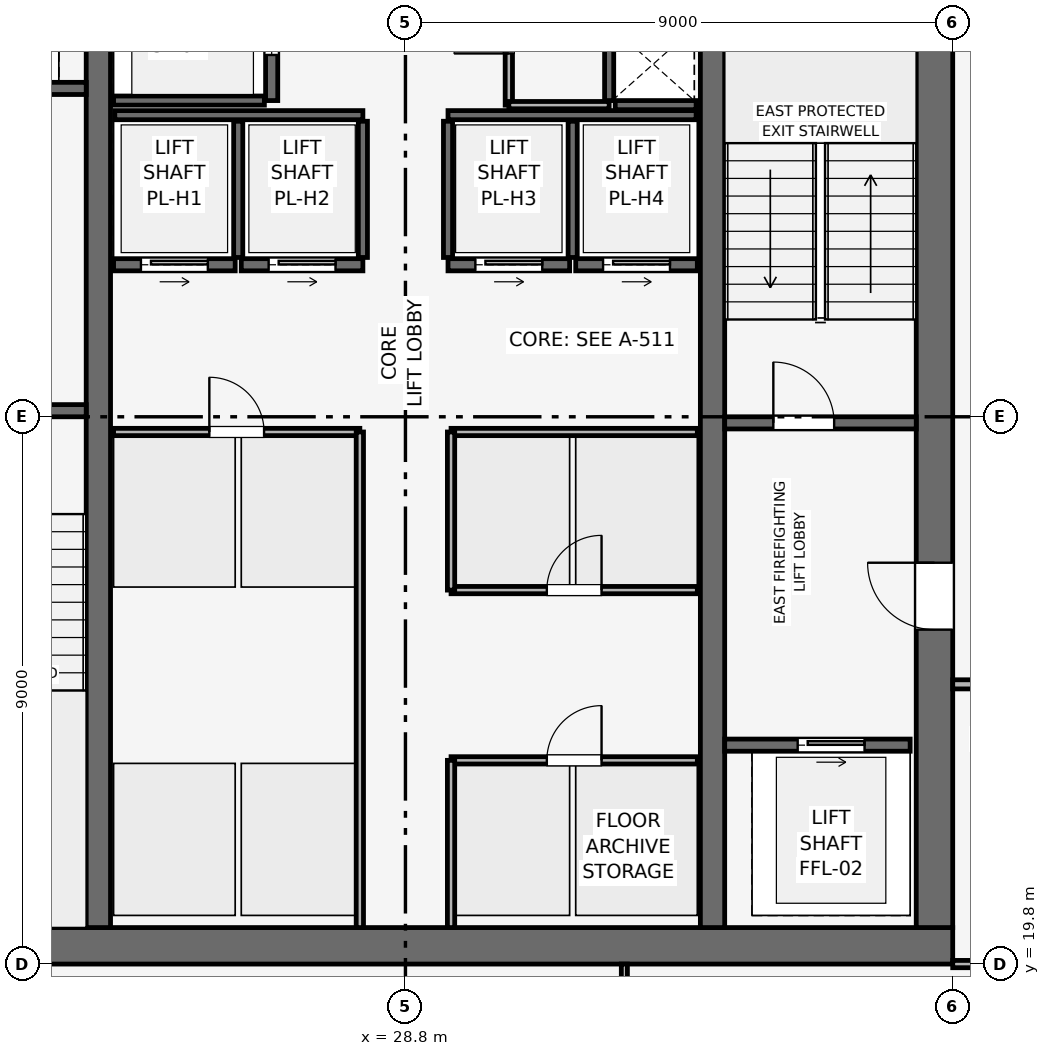
"""IFC4 building model, lengths in metres.
Left out: names, types, materials, properties, quantities, classifications, styles, units other than length and angle.
Written with IfcOpenShell. Run it as: python <this file> out.ifc"""

import sys

from ifc_helpers import new_model, si_unit, direction, frame, frame_2d, origin, place, context, subcontext, project, spatial, rectangle, extrude, element, fill, save


model = new_model("IFC4")
c1 = context("Model", 3, precision=1e-05, world=origin(), true_north=direction((0.0, 1.0)))
c2 = subcontext(c1, "Body", "Model", "MODEL_VIEW")
j1 = project(units=[si_unit("LENGTHUNIT", "METRE"), si_unit("PLANEANGLEUNIT", "RADIAN")], contexts=[c1])
p1 = place(None, origin())
s1 = spatial("IfcSite", under=j1, at=p1, CompositionType="ELEMENT")
p2 = place(p1, origin())
s2 = spatial("IfcBuilding", under=s1, at=p2, CompositionType="ELEMENT")
p3 = place(p2, frame((0.0, 0.0, 336.75)))
s3 = spatial("IfcBuildingStorey", under=s2, at=p3, CompositionType="ELEMENT", Elevation=336.75)
p4 = place(p3, frame((19.8, 20.1, 0.0), z_axis=(0.0, 0.0, 1.0), x_axis=(1.0, 0.0, 0.0)))
e1 = element("IfcWall", 1, at=p4, inside=s3, PredefinedType="SHEAR", context=c2, shape_type="SweptSolid", body=[
    extrude(rectangle(XDim=18.0, YDim=0.6, at=frame_2d((9.0, 0.0))), origin(), (0.0, 0.0, 1.0), 3.75),
])
p5 = place(p3, frame((37.5, 20.4, 0.0), z_axis=(0.0, 0.0, 1.0), x_axis=(0.0, 1.0, 0.0)))
e2 = element("IfcWall", 2, at=p5, inside=s3, PredefinedType="SHEAR", context=c2, shape_type="SweptSolid", body=[
    extrude(rectangle(XDim=16.8, YDim=0.6, at=frame_2d((8.4, 0.0))), origin(), (0.0, 0.0, 1.0), 3.75),
])
p6 = place(p5, frame((4.9, 0.0, 0.0)))
e3 = element("IfcOpeningElement", 3, at=p6, cuts=e2, PredefinedType="OPENING", context=c2, shape_type="SweptSolid", body=[
    extrude(rectangle(XDim=1.1, YDim=2.15, at=frame_2d((0.55, 1.075))), frame((0.0, 0.31, 0.0), z_axis=(0.0, -1.0, 0.0), x_axis=(1.0, 0.0, 0.0)), (0.0, 0.0, 1.0), 0.62),
])
for number, where, z_axis, x_axis in (
    (4, (23.75, 20.4, 0.0), (0.0, 0.0, 1.0), (0.0, 1.0, 0.0)),
    (5, (33.85, 20.4, 0.0), (0.0, 0.0, 1.0), (0.0, 1.0, 0.0)),
):
    element("IfcWall", number, at=place(p3, frame(where, z_axis=z_axis, x_axis=x_axis)), inside=s3, PredefinedType="SHEAR", context=c2, shape_type="SweptSolid", body=[
        extrude(rectangle(XDim=16.8, YDim=0.4, at=frame_2d((8.4, 0.0))), origin(), (0.0, 0.0, 1.0), 3.75),
    ])
p7 = place(p3, frame((20.4, 28.9, 0.0), z_axis=(0.0, 0.0, 1.0), x_axis=(1.0, 0.0, 0.0)))
e6 = element("IfcWall", 6, at=p7, inside=s3, PredefinedType="SHEAR", context=c2, shape_type="SweptSolid", body=[
    extrude(rectangle(XDim=3.15, YDim=0.2, at=frame_2d((1.575, 0.0))), origin(), (0.0, 0.0, 1.0), 3.51),
])
p8 = place(p7, frame((0.8, 0.0, 0.0)))
e7 = element("IfcOpeningElement", 7, at=p8, cuts=e6, PredefinedType="OPENING", context=c2, shape_type="SweptSolid", body=[
    extrude(rectangle(XDim=1.0, YDim=2.1, at=frame_2d((0.5, 1.05))), frame((0.0, 0.11, 0.0), z_axis=(0.0, -1.0, 0.0), x_axis=(1.0, 0.0, 0.0)), (0.0, 0.0, 1.0), 0.22),
])
p9 = place(p3, frame((34.05, 28.7, 0.0), z_axis=(0.0, 0.0, 1.0), x_axis=(1.0, 0.0, 0.0)))
e8 = element("IfcWall", 8, at=p9, inside=s3, PredefinedType="SHEAR", context=c2, shape_type="SweptSolid", body=[
    extrude(rectangle(XDim=3.15, YDim=0.2, at=frame_2d((1.575, 0.0))), origin(), (0.0, 0.0, 1.0), 3.51),
])
p10 = place(p9, frame((0.8, 0.0, 0.0)))
e9 = element("IfcOpeningElement", 9, at=p10, cuts=e8, PredefinedType="OPENING", context=c2, shape_type="SweptSolid", body=[
    extrude(rectangle(XDim=1.0, YDim=2.1, at=frame_2d((0.5, 1.05))), frame((0.0, 0.11, 0.0), z_axis=(0.0, -1.0, 0.0), x_axis=(1.0, 0.0, 0.0)), (0.0, 0.0, 1.0), 0.22),
])
p11 = place(p3, frame((32.15, 34.0, 0.0), z_axis=(0.0, 0.0, 1.0), x_axis=(0.0, 1.0, 0.0)))
e10 = element("IfcWall", 10, at=p11, inside=s3, PredefinedType="SHEAR", context=c2, shape_type="SweptSolid", body=[
    extrude(rectangle(XDim=3.2, YDim=0.15, at=frame_2d((1.6, 0.0))), origin(), (0.0, 0.0, 1.0), 3.51),
])
p12 = place(p3, frame((32.25, 33.925, 0.0), z_axis=(0.0, 0.0, 1.0), x_axis=(1.0, 0.0, 0.0)))
e11 = element("IfcWall", 11, at=p12, inside=s3, PredefinedType="SHEAR", context=c2, shape_type="SweptSolid", body=[
    extrude(rectangle(XDim=1.33, YDim=0.15, at=frame_2d((0.665, 0.0))), origin(), (0.0, 0.0, 1.0), 3.51),
])
p13 = place(p3, frame((20.5, 34.2, 0.0), z_axis=(0.0, 0.0, 1.0), x_axis=(1.0, 0.0, 0.0)))
e12 = element("IfcWall", 12, at=p13, inside=s3, PredefinedType="SHEAR", context=c2, shape_type="SweptSolid", body=[
    extrude(rectangle(XDim=3.05, YDim=0.2, at=frame_2d((1.525, 0.0))), origin(), (0.0, 0.0, 1.0), 3.51),
])
p14 = place(p13, frame((0.75, 0.0, 0.0)))
e13 = element("IfcOpeningElement", 13, at=p14, cuts=e12, PredefinedType="OPENING", context=c2, shape_type="SweptSolid", body=[
    extrude(rectangle(XDim=1.1, YDim=2.15, at=frame_2d((0.55, 1.075))), frame((0.0, 0.11, 0.0), z_axis=(0.0, -1.0, 0.0), x_axis=(1.0, 0.0, 0.0)), (0.0, 0.0, 1.0), 0.22),
])
p15 = place(p3, frame((34.05, 23.4, 0.0), z_axis=(0.0, 0.0, 1.0), x_axis=(1.0, 0.0, 0.0)))
e14 = element("IfcWall", 14, at=p15, inside=s3, PredefinedType="SHEAR", context=c2, shape_type="SweptSolid", body=[
    extrude(rectangle(XDim=3.05, YDim=0.2, at=frame_2d((1.525, 0.0))), origin(), (0.0, 0.0, 1.0), 3.51),
])
p16 = place(p15, frame((1.2, 0.0, 0.0)))
e15 = element("IfcOpeningElement", 15, at=p16, cuts=e14, PredefinedType="OPENING", context=c2, shape_type="SweptSolid", body=[
    extrude(rectangle(XDim=1.1, YDim=2.15, at=frame_2d((0.55, 1.075))), frame((0.0, 0.11, 0.0), z_axis=(0.0, -1.0, 0.0), x_axis=(1.0, 0.0, 0.0)), (0.0, 0.0, 1.0), 0.22),
])
p17 = place(p3, frame((26.6, 34.0, 0.0), z_axis=(0.0, 0.0, 1.0), x_axis=(0.0, 1.0, 0.0)))
e16 = element("IfcWall", 16, at=p17, inside=s3, PredefinedType="SHEAR", context=c2, shape_type="SweptSolid", body=[
    extrude(rectangle(XDim=3.2, YDim=0.2, at=frame_2d((1.6, 0.0))), origin(), (0.0, 0.0, 1.0), 3.51),
])
p18 = place(p17, frame((0.75, 0.0, 0.0)))
e17 = element("IfcOpeningElement", 17, at=p18, cuts=e16, PredefinedType="OPENING", context=c2, shape_type="SweptSolid", body=[
    extrude(rectangle(XDim=1.1, YDim=2.15, at=frame_2d((0.55, 1.075))), frame((0.0, 0.11, 0.0), z_axis=(0.0, -1.0, 0.0), x_axis=(1.0, 0.0, 0.0)), (0.0, 0.0, 1.0), 0.22),
])
p19 = place(p3, frame((24.0, 34.0, 0.0), z_axis=(0.0, 0.0, 1.0), x_axis=(1.0, 0.0, 0.0)))
e18 = element("IfcWall", 18, at=p19, inside=s3, PredefinedType="SHEAR", context=c2, shape_type="SweptSolid", body=[
    extrude(rectangle(XDim=2.48, YDim=0.15, at=frame_2d((1.24, 0.0))), origin(), (0.0, 0.0, 1.0), 3.51),
])
p20 = place(p3, frame((24.0, 31.3, 0.0), z_axis=(0.0, 0.0, 1.0), x_axis=(1.0, 0.0, 0.0)))
e19 = element("IfcWall", 19, at=p20, inside=s3, PredefinedType="SHEAR", context=c2, shape_type="SweptSolid", body=[
    extrude(rectangle(XDim=2.0, YDim=0.2, at=frame_2d((1.0, 0.0))), origin(), (0.0, 0.0, 1.0), 3.51),
])
p21 = place(p20, frame((0.45, 0.0, 0.0)))
e20 = element("IfcOpeningElement", 20, at=p21, cuts=e19, PredefinedType="OPENING", context=c2, shape_type="SweptSolid", body=[
    extrude(rectangle(XDim=1.1, YDim=2.15, at=frame_2d((0.55, 1.075))), frame((0.0, 0.11, 0.0), z_axis=(0.0, -1.0, 0.0), x_axis=(1.0, 0.0, 0.0)), (0.0, 0.0, 1.0), 0.22),
])
p22 = place(p3, frame((26.1, 31.3, 0.0), z_axis=(0.0, 0.0, 1.0), x_axis=(1.0, 0.0, 0.0)))
e21 = element("IfcWall", 21, at=p22, inside=s3, PredefinedType="SHEAR", context=c2, shape_type="SweptSolid", body=[
    extrude(rectangle(XDim=2.0, YDim=0.2, at=frame_2d((1.0, 0.0))), origin(), (0.0, 0.0, 1.0), 3.51),
])
p23 = place(p22, frame((0.45, 0.0, 0.0)))
e22 = element("IfcOpeningElement", 22, at=p23, cuts=e21, PredefinedType="OPENING", context=c2, shape_type="SweptSolid", body=[
    extrude(rectangle(XDim=1.1, YDim=2.15, at=frame_2d((0.55, 1.075))), frame((0.0, 0.11, 0.0), z_axis=(0.0, -1.0, 0.0), x_axis=(1.0, 0.0, 0.0)), (0.0, 0.0, 1.0), 0.22),
])
p24 = place(p3, frame((29.5, 31.3, 0.0), z_axis=(0.0, 0.0, 1.0), x_axis=(1.0, 0.0, 0.0)))
e23 = element("IfcWall", 23, at=p24, inside=s3, PredefinedType="SHEAR", context=c2, shape_type="SweptSolid", body=[
    extrude(rectangle(XDim=2.0, YDim=0.2, at=frame_2d((1.0, 0.0))), origin(), (0.0, 0.0, 1.0), 3.51),
])
p25 = place(p24, frame((0.45, 0.0, 0.0)))
e24 = element("IfcOpeningElement", 24, at=p25, cuts=e23, PredefinedType="OPENING", context=c2, shape_type="SweptSolid", body=[
    extrude(rectangle(XDim=1.1, YDim=2.15, at=frame_2d((0.55, 1.075))), frame((0.0, 0.11, 0.0), z_axis=(0.0, -1.0, 0.0), x_axis=(1.0, 0.0, 0.0)), (0.0, 0.0, 1.0), 0.22),
])
p26 = place(p3, frame((31.6, 31.3, 0.0), z_axis=(0.0, 0.0, 1.0), x_axis=(1.0, 0.0, 0.0)))
e25 = element("IfcWall", 25, at=p26, inside=s3, PredefinedType="SHEAR", context=c2, shape_type="SweptSolid", body=[
    extrude(rectangle(XDim=2.0, YDim=0.2, at=frame_2d((1.0, 0.0))), origin(), (0.0, 0.0, 1.0), 3.51),
])
p27 = place(p26, frame((0.45, 0.0, 0.0)))
e26 = element("IfcOpeningElement", 26, at=p27, cuts=e25, PredefinedType="OPENING", context=c2, shape_type="SweptSolid", body=[
    extrude(rectangle(XDim=1.1, YDim=2.15, at=frame_2d((0.55, 1.075))), frame((0.0, 0.11, 0.0), z_axis=(0.0, -1.0, 0.0), x_axis=(1.0, 0.0, 0.0)), (0.0, 0.0, 1.0), 0.22),
])
for number, where, z_axis, x_axis in (
    (27, (24.02, 33.76, 0.0), (0.0, 0.0, 1.0), (1.0, 0.0, 0.0)),
    (28, (29.5, 33.76, 0.0), (0.0, 0.0, 1.0), (1.0, 0.0, 0.0)),
):
    element("IfcWall", number, at=place(p3, frame(where, z_axis=z_axis, x_axis=x_axis)), inside=s3, PredefinedType="SHEAR", context=c2, shape_type="SweptSolid", body=[
        extrude(rectangle(XDim=4.08, YDim=0.15, at=frame_2d((2.04, 0.0))), origin(), (0.0, 0.0, 1.0), 3.51),
    ])
for number, where, z_axis, x_axis in (
    (29, (26.05, 31.42, 0.0), (0.0, 0.0, 1.0), (0.0, 1.0, 0.0)),
    (30, (28.1, 31.42, 0.0), (0.0, 0.0, 1.0), (0.0, 1.0, 0.0)),
    (31, (29.5, 31.42, 0.0), (0.0, 0.0, 1.0), (0.0, 1.0, 0.0)),
    (32, (31.55, 31.42, 0.0), (0.0, 0.0, 1.0), (0.0, 1.0, 0.0)),
):
    element("IfcWall", number, at=place(p3, frame(where, z_axis=z_axis, x_axis=x_axis)), inside=s3, PredefinedType="SHEAR", context=c2, shape_type="SweptSolid", body=[
        extrude(rectangle(XDim=2.24, YDim=0.15, at=frame_2d((1.12, 0.0))), origin(), (0.0, 0.0, 1.0), 3.51),
    ])
p28 = place(p3, frame((30.5, 33.925, 0.0), z_axis=(0.0, 0.0, 1.0), x_axis=(0.0, 1.0, 0.0)))
e33 = element("IfcWall", 33, at=p28, inside=s3, PredefinedType="PARTITIONING", context=c2, shape_type="SweptSolid", body=[
    extrude(rectangle(XDim=3.275, YDim=0.12, at=frame_2d((1.637, 0.0))), origin(), (0.0, 0.0, 1.0), 3.51),
])
p29 = place(p28, frame((0.85, 0.0, 0.0)))
e34 = element("IfcOpeningElement", 34, at=p29, cuts=e33, PredefinedType="OPENING", context=c2, shape_type="SweptSolid", body=[
    extrude(rectangle(XDim=0.9, YDim=2.1, at=frame_2d((0.45, 1.05))), frame((0.0, 0.07, 0.0), z_axis=(0.0, -1.0, 0.0), x_axis=(1.0, 0.0, 0.0)), (0.0, 0.0, 1.0), 0.14),
])
p30 = place(p3, frame((30.5, 33.925, 0.0), z_axis=(0.0, 0.0, 1.0), x_axis=(1.0, 0.0, 0.0)))
e35 = element("IfcWall", 35, at=p30, inside=s3, PredefinedType="PARTITIONING", context=c2, shape_type="SweptSolid", body=[
    extrude(rectangle(XDim=1.65, YDim=0.12, at=frame_2d((0.825, 0.0))), origin(), (0.0, 0.0, 1.0), 3.51),
])
p31 = place(p3, frame((24.0, 28.55, 0.0), z_axis=(0.0, 0.0, 1.0), x_axis=(1.0, 0.0, 0.0)))
e36 = element("IfcWall", 36, at=p31, inside=s3, PredefinedType="PARTITIONING", context=c2, shape_type="SweptSolid", body=[
    extrude(rectangle(XDim=4.05, YDim=0.12, at=frame_2d((2.025, 0.0))), origin(), (0.0, 0.0, 1.0), 3.51),
])
p32 = place(p31, frame((1.575, 0.0, 0.0)))
e37 = element("IfcOpeningElement", 37, at=p32, cuts=e36, PredefinedType="OPENING", context=c2, shape_type="SweptSolid", body=[
    extrude(rectangle(XDim=0.9, YDim=2.1, at=frame_2d((0.45, 1.05))), frame((0.0, 0.07, 0.0), z_axis=(0.0, -1.0, 0.0), x_axis=(1.0, 0.0, 0.0)), (0.0, 0.0, 1.0), 0.14),
])
p33 = place(p3, frame((28.05, 20.4, 0.0), z_axis=(0.0, 0.0, 1.0), x_axis=(0.0, 1.0, 0.0)))
e38 = element("IfcWall", 38, at=p33, inside=s3, PredefinedType="PARTITIONING", context=c2, shape_type="SweptSolid", body=[
    extrude(rectangle(XDim=8.15, YDim=0.12, at=frame_2d((4.075, 0.0))), origin(), (0.0, 0.0, 1.0), 3.51),
])
p34 = place(p3, frame((29.55, 23.15, 0.0), z_axis=(0.0, 0.0, 1.0), x_axis=(1.0, 0.0, 0.0)))
e39 = element("IfcWall", 39, at=p34, inside=s3, PredefinedType="PARTITIONING", context=c2, shape_type="SweptSolid", body=[
    extrude(rectangle(XDim=4.05, YDim=0.12, at=frame_2d((2.025, 0.0))), origin(), (0.0, 0.0, 1.0), 3.51),
])
p35 = place(p34, frame((1.575, 0.0, 0.0)))
e40 = element("IfcOpeningElement", 40, at=p35, cuts=e39, PredefinedType="OPENING", context=c2, shape_type="SweptSolid", body=[
    extrude(rectangle(XDim=0.9, YDim=2.1, at=frame_2d((0.45, 1.05))), frame((0.0, 0.07, 0.0), z_axis=(0.0, -1.0, 0.0), x_axis=(1.0, 0.0, 0.0)), (0.0, 0.0, 1.0), 0.14),
])
p36 = place(p3, frame((29.55, 20.4, 0.0), z_axis=(0.0, 0.0, 1.0), x_axis=(0.0, 1.0, 0.0)))
e41 = element("IfcWall", 41, at=p36, inside=s3, PredefinedType="PARTITIONING", context=c2, shape_type="SweptSolid", body=[
    extrude(rectangle(XDim=2.75, YDim=0.12, at=frame_2d((1.375, 0.0))), origin(), (0.0, 0.0, 1.0), 3.51),
])
p37 = place(p3, frame((29.55, 25.95, 0.0), z_axis=(0.0, 0.0, 1.0), x_axis=(1.0, 0.0, 0.0)))
e42 = element("IfcWall", 42, at=p37, inside=s3, PredefinedType="PARTITIONING", context=c2, shape_type="SweptSolid", body=[
    extrude(rectangle(XDim=4.05, YDim=0.12, at=frame_2d((2.025, 0.0))), origin(), (0.0, 0.0, 1.0), 3.51),
])
p38 = place(p37, frame((1.575, 0.0, 0.0)))
e43 = element("IfcOpeningElement", 43, at=p38, cuts=e42, PredefinedType="OPENING", context=c2, shape_type="SweptSolid", body=[
    extrude(rectangle(XDim=0.9, YDim=2.1, at=frame_2d((0.45, 1.05))), frame((0.0, 0.07, 0.0), z_axis=(0.0, -1.0, 0.0), x_axis=(1.0, 0.0, 0.0)), (0.0, 0.0, 1.0), 0.14),
])
p39 = place(p3, frame((29.55, 28.55, 0.0), z_axis=(0.0, 0.0, 1.0), x_axis=(1.0, 0.0, 0.0)))
e44 = element("IfcWall", 44, at=p39, inside=s3, PredefinedType="PARTITIONING", context=c2, shape_type="SweptSolid", body=[
    extrude(rectangle(XDim=4.05, YDim=0.12, at=frame_2d((2.025, 0.0))), origin(), (0.0, 0.0, 1.0), 3.51),
])
p40 = place(p3, frame((29.55, 25.95, 0.0), z_axis=(0.0, 0.0, 1.0), x_axis=(0.0, 1.0, 0.0)))
e45 = element("IfcWall", 45, at=p40, inside=s3, PredefinedType="PARTITIONING", context=c2, shape_type="SweptSolid", body=[
    extrude(rectangle(XDim=2.6, YDim=0.12, at=frame_2d((1.3, 0.0))), origin(), (0.0, 0.0, 1.0), 3.51),
])
p41 = place(p3, frame((32.4, 6.73, 0.0), z_axis=(0.0, 0.0, 1.0), x_axis=(0.0, 1.0, 0.0)))
e46 = element("IfcWall", 46, at=p41, inside=s3, PredefinedType="MOVABLE", context=c2, shape_type="SweptSolid", body=[
    extrude(rectangle(XDim=13.07, YDim=0.1, at=frame_2d((6.535, 0.0))), origin(), (0.0, 0.0, 1.0), 3.135),
])
p42 = place(p41, frame((10.67, 0.0, 0.0)))
e47 = element("IfcOpeningElement", 47, at=p42, cuts=e46, PredefinedType="OPENING", context=c2, shape_type="SweptSolid", body=[
    extrude(rectangle(XDim=0.9, YDim=2.1, at=frame_2d((0.45, 1.05))), frame((0.0, 0.06, 0.0), z_axis=(0.0, -1.0, 0.0), x_axis=(1.0, 0.0, 0.0)), (0.0, 0.0, 1.0), 0.12),
])
p43 = place(p3, frame((37.8, 19.8, 0.0), z_axis=(0.0, 0.0, 1.0), x_axis=(1.0, 0.0, 0.0)))
e48 = element("IfcWall", 48, at=p43, inside=s3, PredefinedType="PARTITIONING", context=c2, shape_type="SweptSolid", body=[
    extrude(rectangle(XDim=13.07, YDim=0.12, at=frame_2d((6.535, 0.0))), origin(), (0.0, 0.0, 1.0), 3.095),
])
p44 = place(p3, frame((37.8, 24.4, 0.0), z_axis=(0.0, 0.0, 1.0), x_axis=(1.0, 0.0, 0.0)))
e49 = element("IfcWall", 49, at=p44, inside=s3, PredefinedType="PARTITIONING", context=c2, shape_type="SweptSolid", body=[
    extrude(rectangle(XDim=1.9, YDim=0.15, at=frame_2d((0.95, 0.0))), origin(), (0.0, 0.0, 1.0), 3.51),
])
p45 = place(p44, frame((0.45, 0.0, 0.0)))
e50 = element("IfcOpeningElement", 50, at=p45, cuts=e49, PredefinedType="OPENING", context=c2, shape_type="SweptSolid", body=[
    extrude(rectangle(XDim=0.9, YDim=2.1, at=frame_2d((0.45, 1.05))), frame((0.0, 0.085, 0.0), z_axis=(0.0, -1.0, 0.0), x_axis=(1.0, 0.0, 0.0)), (0.0, 0.0, 1.0), 0.17),
])
p46 = place(p10, origin())
e51 = element("IfcDoor", 51, at=p46, inside=s3, OperationType="SINGLE_SWING_LEFT", PredefinedType="DOOR", context=c2, shape_type="SweptSolid", body=[
    extrude(rectangle(XDim=1.0, YDim=2.1, at=frame_2d((0.5, 1.05))), frame((0.0, 0.025, 0.0), z_axis=(0.0, -1.0, 0.0), x_axis=(1.0, 0.0, 0.0)), (0.0, 0.0, 1.0), 0.05),
])
fill(e9, e51)
p47 = place(p16, origin())
e52 = element("IfcDoor", 52, at=p47, inside=s3, OperationType="SLIDING_TO_RIGHT", PredefinedType="DOOR", context=c2, shape_type="SweptSolid", body=[
    extrude(rectangle(XDim=1.1, YDim=2.15, at=frame_2d((0.55, 1.075))), frame((0.0, 0.025, 0.0), z_axis=(0.0, -1.0, 0.0), x_axis=(1.0, 0.0, 0.0)), (0.0, 0.0, 1.0), 0.05),
])
fill(e15, e52)
p48 = place(p18, origin())
e53 = element("IfcDoor", 53, at=p48, inside=s3, OperationType="SLIDING_TO_RIGHT", PredefinedType="DOOR", context=c2, shape_type="SweptSolid", body=[
    extrude(rectangle(XDim=1.1, YDim=2.15, at=frame_2d((0.55, 1.075))), frame((0.0, 0.025, 0.0), z_axis=(0.0, -1.0, 0.0), x_axis=(1.0, 0.0, 0.0)), (0.0, 0.0, 1.0), 0.05),
])
fill(e17, e53)
p49 = place(p21, origin())
e54 = element("IfcDoor", 54, at=p49, inside=s3, OperationType="SLIDING_TO_RIGHT", PredefinedType="DOOR", context=c2, shape_type="SweptSolid", body=[
    extrude(rectangle(XDim=1.1, YDim=2.15, at=frame_2d((0.55, 1.075))), frame((0.0, 0.025, 0.0), z_axis=(0.0, -1.0, 0.0), x_axis=(1.0, 0.0, 0.0)), (0.0, 0.0, 1.0), 0.05),
])
fill(e20, e54)
p50 = place(p23, origin())
e55 = element("IfcDoor", 55, at=p50, inside=s3, OperationType="SLIDING_TO_RIGHT", PredefinedType="DOOR", context=c2, shape_type="SweptSolid", body=[
    extrude(rectangle(XDim=1.1, YDim=2.15, at=frame_2d((0.55, 1.075))), frame((0.0, 0.025, 0.0), z_axis=(0.0, -1.0, 0.0), x_axis=(1.0, 0.0, 0.0)), (0.0, 0.0, 1.0), 0.05),
])
fill(e22, e55)
p51 = place(p25, origin())
e56 = element("IfcDoor", 56, at=p51, inside=s3, OperationType="SLIDING_TO_RIGHT", PredefinedType="DOOR", context=c2, shape_type="SweptSolid", body=[
    extrude(rectangle(XDim=1.1, YDim=2.15, at=frame_2d((0.55, 1.075))), frame((0.0, 0.025, 0.0), z_axis=(0.0, -1.0, 0.0), x_axis=(1.0, 0.0, 0.0)), (0.0, 0.0, 1.0), 0.05),
])
fill(e24, e56)
p52 = place(p27, origin())
e57 = element("IfcDoor", 57, at=p52, inside=s3, OperationType="SLIDING_TO_RIGHT", PredefinedType="DOOR", context=c2, shape_type="SweptSolid", body=[
    extrude(rectangle(XDim=1.1, YDim=2.15, at=frame_2d((0.55, 1.075))), frame((0.0, 0.025, 0.0), z_axis=(0.0, -1.0, 0.0), x_axis=(1.0, 0.0, 0.0)), (0.0, 0.0, 1.0), 0.05),
])
fill(e26, e57)
p53 = place(p29, origin())
e58 = element("IfcDoor", 58, at=p53, inside=s3, OperationType="SINGLE_SWING_LEFT", PredefinedType="DOOR", context=c2, shape_type="SweptSolid", body=[
    extrude(rectangle(XDim=0.9, YDim=2.1, at=frame_2d((0.45, 1.05))), frame((0.0, 0.025, 0.0), z_axis=(0.0, -1.0, 0.0), x_axis=(1.0, 0.0, 0.0)), (0.0, 0.0, 1.0), 0.05),
])
fill(e34, e58)
p54 = place(p32, origin())
e59 = element("IfcDoor", 59, at=p54, inside=s3, OperationType="SINGLE_SWING_LEFT", PredefinedType="DOOR", context=c2, shape_type="SweptSolid", body=[
    extrude(rectangle(XDim=0.9, YDim=2.1, at=frame_2d((0.45, 1.05))), frame((0.0, 0.025, 0.0), z_axis=(0.0, -1.0, 0.0), x_axis=(1.0, 0.0, 0.0)), (0.0, 0.0, 1.0), 0.05),
])
fill(e37, e59)
p55 = place(p35, origin())
e60 = element("IfcDoor", 60, at=p55, inside=s3, OperationType="SINGLE_SWING_RIGHT", PredefinedType="DOOR", context=c2, shape_type="SweptSolid", body=[
    extrude(rectangle(XDim=0.9, YDim=2.1, at=frame_2d((0.45, 1.05))), frame((0.0, 0.025, 0.0), z_axis=(0.0, -1.0, 0.0), x_axis=(1.0, 0.0, 0.0)), (0.0, 0.0, 1.0), 0.05),
])
fill(e40, e60)
p56 = place(p38, origin())
e61 = element("IfcDoor", 61, at=p56, inside=s3, OperationType="SINGLE_SWING_RIGHT", PredefinedType="DOOR", context=c2, shape_type="SweptSolid", body=[
    extrude(rectangle(XDim=0.9, YDim=2.1, at=frame_2d((0.45, 1.05))), frame((0.0, 0.025, 0.0), z_axis=(0.0, -1.0, 0.0), x_axis=(1.0, 0.0, 0.0)), (0.0, 0.0, 1.0), 0.05),
])
fill(e43, e61)
p57 = place(p6, origin())
e62 = element("IfcDoor", 62, at=p57, inside=s3, OperationType="SINGLE_SWING_RIGHT", PredefinedType="DOOR", context=c2, shape_type="SweptSolid", body=[
    extrude(rectangle(XDim=1.1, YDim=2.15, at=frame_2d((0.55, 1.075))), frame((0.0, 0.025, 0.0), z_axis=(0.0, -1.0, 0.0), x_axis=(1.0, 0.0, 0.0)), (0.0, 0.0, 1.0), 0.05),
])
fill(e3, e62)
save(model, sys.argv[1])
